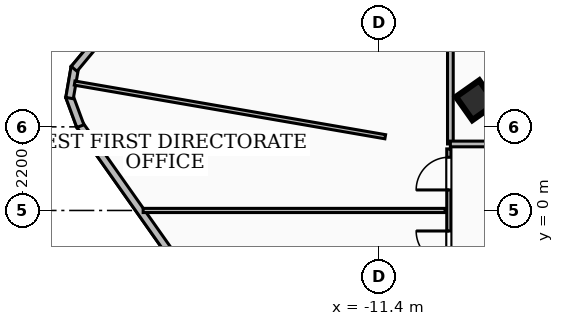
"""IFC4 building model, lengths in metres.
Left out: names, types, materials, properties, quantities, classifications, styles, units other than length and angle.
Written with IfcOpenShell. Run it as: python <this file> out.ifc"""

import sys

from ifc_helpers import new_model, si_unit, direction, frame, frame_2d, origin, origin_2d, place, context, subcontext, project, spatial, rectangle, extrude, element, fill, save


model = new_model("IFC4")
c1 = context("Model", 3, precision=1e-05, world=origin(), true_north=direction((0.0, 1.0)))
c2 = subcontext(c1, "Body", "Model", "MODEL_VIEW")
j1 = project(units=[si_unit("LENGTHUNIT", "METRE"), si_unit("PLANEANGLEUNIT", "RADIAN")], contexts=[c1])
p1 = place(None, origin())
s1 = spatial("IfcSite", under=j1, at=p1, CompositionType="ELEMENT")
p2 = place(p1, origin())
s2 = spatial("IfcBuilding", under=s1, at=p2, CompositionType="ELEMENT")
p3 = place(p2, frame((0.0, 0.0, 225.72)))
s3 = spatial("IfcBuildingStorey", under=s2, at=p3, CompositionType="ELEMENT", Elevation=225.72)
p4 = place(p3, frame((-8.85, 2.9, 0.0), z_axis=(0.0, 0.0, 1.0), x_axis=(0.817144898335, 0.57643231617, 0.0)))
e1 = element("IfcColumn", 1, at=p4, inside=s3, PredefinedType="COLUMN", context=c2, shape_type="SweptSolid", body=[
    extrude(rectangle(XDim=0.75, YDim=0.75, at=origin_2d()), origin(), (0.0, 0.0, 1.0), 3.42),
])
p5 = place(p3, frame((-4.337, -18.921, 0.0), z_axis=(0.0, 0.0, 1.0), x_axis=(-0.576413609547, 0.817158094085, 0.0)))
e2 = element("IfcWall", 2, at=p5, inside=s3, PredefinedType="SOLIDWALL", context=c2, shape_type="SweptSolid", body=[
    extrude(rectangle(XDim=25.923, YDim=0.2, at=frame_2d((12.961, 0.0))), origin(), (0.0, 0.0, 1.0), 3.14),
])
p6 = place(p5, frame((19.02, 0.0, 0.85)))
e3 = element("IfcOpeningElement", 3, at=p6, cuts=e2, PredefinedType="OPENING", context=c2, shape_type="SweptSolid", body=[
    extrude(rectangle(XDim=2.4, YDim=1.65, at=frame_2d((1.2, 0.825))), frame((0.0, 0.11, 0.0), z_axis=(0.0, -1.0, 0.0), x_axis=(1.0, 0.0, 0.0)), (0.0, 0.0, 1.0), 0.22),
])
p7 = place(p3, frame((-19.256, 2.219, 0.0), z_axis=(0.0, 0.0, 1.0), x_axis=(-0.345975487894, 0.938243551417, 0.0)))
e4 = element("IfcWall", 4, at=p7, inside=s3, PredefinedType="SOLIDWALL", context=c2, shape_type="SweptSolid", body=[
    extrude(rectangle(XDim=0.838, YDim=0.2, at=frame_2d((0.419, 0.0))), origin(), (0.0, 0.0, 1.0), 3.14),
])
p8 = place(p3, frame((-19.541, 2.957, 0.0), z_axis=(0.0, 0.0, 1.0), x_axis=(0.169867275979, 0.985466949497, 0.0)))
e5 = element("IfcWall", 5, at=p8, inside=s3, PredefinedType="SOLIDWALL", context=c2, shape_type="SweptSolid", body=[
    extrude(rectangle(XDim=0.825, YDim=0.2, at=frame_2d((0.413, 0.0))), origin(), (0.0, 0.0, 1.0), 3.14),
])
p9 = place(p3, frame((-19.421, 3.726, 0.0), z_axis=(0.0, 0.0, 1.0), x_axis=(0.639610986305, 0.768698761673, 0.0)))
e6 = element("IfcWall", 6, at=p9, inside=s3, PredefinedType="SOLIDWALL", context=c2, shape_type="SweptSolid", body=[
    extrude(rectangle(XDim=0.838, YDim=0.2, at=frame_2d((0.419, 0.0))), origin(), (0.0, 0.0, 1.0), 3.14),
])
p10 = place(p3, frame((-9.52, 1.75, 0.0), z_axis=(0.0, 0.0, 1.0), x_axis=(0.0, 1.0, 0.0)))
e7 = element("IfcWall", 7, at=p10, inside=s3, PredefinedType="PARTITIONING", context=c2, shape_type="SweptSolid", body=[
    extrude(rectangle(XDim=6.63, YDim=0.15, at=frame_2d((3.315, 0.0))), origin(), (0.0, 0.0, 1.0), 3.14),
])
p11 = place(p3, frame((-7.85, 1.75, 0.0), z_axis=(0.0, 0.0, 1.0), x_axis=(-1.0, 0.0, 0.0)))
e8 = element("IfcWall", 8, at=p11, inside=s3, PredefinedType="PARTITIONING", context=c2, shape_type="SweptSolid", body=[
    extrude(rectangle(XDim=1.67, YDim=0.15, at=frame_2d((0.835, 0.0))), origin(), (0.0, 0.0, 1.0), 2.37),
])
p12 = place(p3, frame((-17.604, 0.0, 0.0), z_axis=(0.0, 0.0, 1.0), x_axis=(1.0, 0.0, 0.0)))
e9 = element("IfcWall", 9, at=p12, inside=s3, PredefinedType="PARTITIONING", context=c2, shape_type="SweptSolid", body=[
    extrude(rectangle(XDim=7.944, YDim=0.11, at=frame_2d((3.972, 0.0))), origin(), (0.0, 0.0, 1.0), 3.14),
])
p13 = place(p3, frame((-9.56, -1.62, 0.0), z_axis=(0.0, 0.0, 1.0), x_axis=(0.0, 1.0, 0.0)))
e10 = element("IfcWall", 10, at=p13, inside=s3, PredefinedType="PARTITIONING", context=c2, shape_type="SweptSolid", body=[
    extrude(rectangle(XDim=3.24, YDim=0.11, at=frame_2d((1.62, 0.0))), origin(), (0.0, 0.0, 1.0), 3.14),
])
p14 = place(p13, frame((0.22, 0.0, 0.0)))
e11 = element("IfcOpeningElement", 11, at=p14, cuts=e10, PredefinedType="OPENING", context=c2, shape_type="SweptSolid", body=[
    extrude(rectangle(XDim=0.86, YDim=2.04, at=frame_2d((0.43, 1.02))), frame((0.0, 0.065, 0.0), z_axis=(0.0, -1.0, 0.0), x_axis=(1.0, 0.0, 0.0)), (0.0, 0.0, 1.0), 0.13),
])
p15 = place(p13, frame((2.16, 0.0, 0.0)))
e12 = element("IfcOpeningElement", 12, at=p15, cuts=e10, PredefinedType="OPENING", context=c2, shape_type="SweptSolid", body=[
    extrude(rectangle(XDim=0.86, YDim=2.04, at=frame_2d((0.43, 1.02))), frame((0.0, 0.065, 0.0), z_axis=(0.0, -1.0, 0.0), x_axis=(1.0, 0.0, 0.0)), (0.0, 0.0, 1.0), 0.13),
])
p16 = place(p3, frame((-11.234, 1.94, 0.0), z_axis=(0.0, 0.0, 1.0), x_axis=(-0.985400402951, 0.170252887973, 0.0)))
e13 = element("IfcWall", 13, at=p16, inside=s3, PredefinedType="PARTITIONING", context=c2, shape_type="SweptSolid", body=[
    extrude(rectangle(XDim=8.294, YDim=0.11, at=frame_2d((4.147, 0.0))), origin(), (0.0, 0.0, 1.0), 3.14),
])
p17 = place(p14, origin())
e14 = element("IfcDoor", 14, at=p17, inside=s3, OperationType="SINGLE_SWING_RIGHT", PredefinedType="DOOR", context=c2, shape_type="SweptSolid", body=[
    extrude(rectangle(XDim=0.86, YDim=2.04, at=frame_2d((0.43, 1.02))), frame((0.0, 0.025, 0.0), z_axis=(0.0, -1.0, 0.0), x_axis=(1.0, 0.0, 0.0)), (0.0, 0.0, 1.0), 0.05),
])
fill(e11, e14)
p18 = place(p15, origin())
e15 = element("IfcDoor", 15, at=p18, inside=s3, OperationType="SINGLE_SWING_LEFT", PredefinedType="DOOR", context=c2, shape_type="SweptSolid", body=[
    extrude(rectangle(XDim=0.86, YDim=2.04, at=frame_2d((0.43, 1.02))), frame((0.0, 0.025, 0.0), z_axis=(0.0, -1.0, 0.0), x_axis=(1.0, 0.0, 0.0)), (0.0, 0.0, 1.0), 0.05),
])
fill(e12, e15)
save(model, sys.argv[1])
